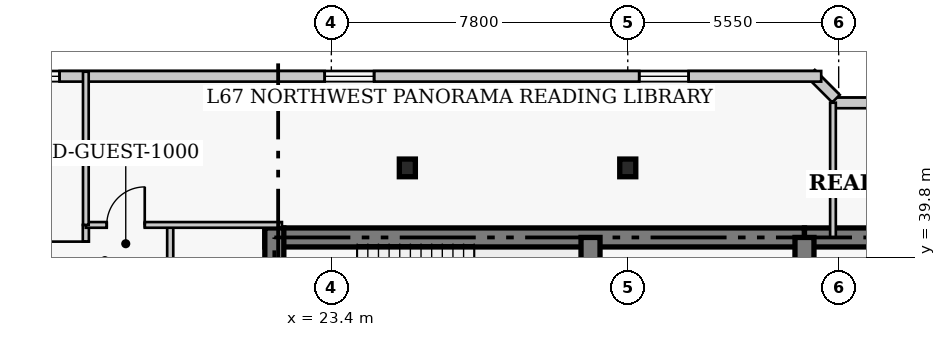
"""IFC4 building model, lengths in metres.
Left out: names, types, materials, properties, quantities, classifications, styles, units other than length and angle.
Written with IfcOpenShell. Run it as: python <this file> out.ifc"""

import sys

from ifc_helpers import new_model, si_unit, direction, frame, frame_2d, origin, origin_2d, place, context, subcontext, project, spatial, rectangle, i_section, extrude, element, fill, save


model = new_model("IFC4")
c1 = context("Model", 3, precision=1e-05, world=origin(), true_north=direction((0.0, 1.0)))
c2 = subcontext(c1, "Body", "Model", "MODEL_VIEW")
j1 = project(units=[si_unit("LENGTHUNIT", "METRE"), si_unit("PLANEANGLEUNIT", "RADIAN")], contexts=[c1])
p1 = place(None, origin())
s1 = spatial("IfcSite", under=j1, at=p1, CompositionType="ELEMENT")
p2 = place(p1, origin())
s2 = spatial("IfcBuilding", under=s1, at=p2, CompositionType="ELEMENT")
p3 = place(p2, frame((0.0, 0.0, 269.4)))
s3 = spatial("IfcBuildingStorey", under=s2, at=p3, CompositionType="ELEMENT", Elevation=269.4)
p4 = place(p3, frame((21.65, 40.32, 0.0), z_axis=(0.0, 0.0, 1.0), x_axis=(1.0, 0.0, 0.0)))
e1 = element("IfcWall", 1, at=p4, inside=s3, PredefinedType="SHEAR", context=c2, shape_type="SweptSolid", body=[
    extrude(rectangle(XDim=14.2, YDim=0.5, at=frame_2d((7.1, 0.0))), origin(), (0.0, 0.0, 1.0), 4.0),
])
p5 = place(p3, frame((35.85, 40.32, 0.0), z_axis=(0.0, 0.0, 1.0), x_axis=(1.0, 0.0, 0.0)))
e2 = element("IfcWall", 2, at=p5, inside=s3, PredefinedType="SHEAR", context=c2, shape_type="SweptSolid", body=[
    extrude(rectangle(XDim=12.6, YDim=0.5, at=frame_2d((6.3, 0.0))), origin(), (0.0, 0.0, 1.0), 4.0),
])
p6 = place(p3, frame((21.9, 27.05, 0.0), z_axis=(0.0, 0.0, 1.0), x_axis=(0.0, 1.0, 0.0)))
e3 = element("IfcWall", 3, at=p6, inside=s3, PredefinedType="SHEAR", context=c2, shape_type="SweptSolid", body=[
    extrude(rectangle(XDim=13.52, YDim=0.5, at=frame_2d((6.76, 0.0))), origin(), (0.0, 0.0, 1.0), 4.0),
])
p7 = place(p3, frame((30.22, 33.0, 0.0), z_axis=(0.0, 0.0, 1.0), x_axis=(0.0, 1.0, 0.0)))
e4 = element("IfcWall", 4, at=p7, inside=s3, PredefinedType="SHEAR", context=c2, shape_type="SweptSolid", body=[
    extrude(rectangle(XDim=7.32, YDim=0.5, at=frame_2d((3.66, 0.0))), origin(), (0.0, 0.0, 1.0), 4.0),
])
p8 = place(p3, frame((35.85, 36.37, 0.0), z_axis=(0.0, 0.0, 1.0), x_axis=(0.0, 1.0, 0.0)))
e5 = element("IfcWall", 5, at=p8, inside=s3, PredefinedType="SHEAR", context=c2, shape_type="SweptSolid", body=[
    extrude(rectangle(XDim=3.95, YDim=0.5, at=frame_2d((1.975, 0.0))), origin(), (0.0, 0.0, 1.0), 4.0),
])
p9 = place(p8, frame((0.88, 0.0, 0.0)))
e6 = element("IfcOpeningElement", 6, at=p9, cuts=e5, PredefinedType="OPENING", context=c2, shape_type="SweptSolid", body=[
    extrude(rectangle(XDim=1.1, YDim=2.15, at=frame_2d((0.55, 1.075))), frame((0.0, 0.26, 0.0), z_axis=(0.0, -1.0, 0.0), x_axis=(1.0, 0.0, 0.0)), (0.0, 0.0, 1.0), 0.52),
])
for number, where, z_axis, x_axis in (
    (7, (25.4, 42.15, 0.0), (0.0, 0.0, 1.0), (1.0, 0.0, 0.0)),
    (8, (31.2, 42.15, 0.0), (0.0, 0.0, 1.0), (1.0, 0.0, 0.0)),
):
    element("IfcColumn", number, at=place(p3, frame(where, z_axis=z_axis, x_axis=x_axis)), inside=s3, PredefinedType="COLUMN", context=c2, shape_type="SweptSolid", body=[
        extrude(i_section(OverallWidth=0.422, OverallDepth=0.465, WebThickness=0.045, FlangeThickness=0.073, FilletRadius=0.017, at=origin_2d()), origin(), (0.0, 0.0, 1.0), 4.0),
    ])
p10 = place(p3, frame((41.39, 43.86, 0.0), z_axis=(0.0, 0.0, 1.0), x_axis=(-1.0, 0.0, 0.0)))
e9 = element("IfcWall", 9, at=p10, inside=s3, PredefinedType="SOLIDWALL", context=c2, shape_type="SweptSolid", body=[
    extrude(rectangle(XDim=4.78, YDim=0.28, at=frame_2d((2.39, 0.0))), origin(), (0.0, 0.0, 1.0), 3.76),
])
p11 = place(p10, frame((1.74, 0.0, 0.85)))
e10 = element("IfcOpeningElement", 10, at=p11, cuts=e9, PredefinedType="OPENING", context=c2, shape_type="SweptSolid", body=[
    extrude(rectangle(XDim=1.3, YDim=1.7, at=frame_2d((0.65, 0.85))), frame((0.0, 0.15, 0.0), z_axis=(0.0, -1.0, 0.0), x_axis=(1.0, 0.0, 0.0)), (0.0, 0.0, 1.0), 0.3),
])
p12 = place(p3, frame((36.679, 43.973, 0.0), z_axis=(0.0, 0.0, 1.0), x_axis=(-0.706975312048, 0.707238225886, 0.0)))
e11 = element("IfcWall", 11, at=p12, inside=s3, PredefinedType="SOLIDWALL", context=c2, shape_type="SweptSolid", body=[
    extrude(rectangle(XDim=0.929, YDim=0.28, at=frame_2d((0.464, 0.0))), origin(), (0.0, 0.0, 1.0), 3.76),
])
p13 = place(p3, frame((36.29, 44.56, 0.0), z_axis=(0.0, 0.0, 1.0), x_axis=(-1.0, 0.0, 0.0)))
e12 = element("IfcWall", 12, at=p13, inside=s3, PredefinedType="SOLIDWALL", context=c2, shape_type="SweptSolid", body=[
    extrude(rectangle(XDim=24.83, YDim=0.28, at=frame_2d((12.415, 0.0))), origin(), (0.0, 0.0, 1.0), 3.76),
])
p14 = place(p13, frame((3.488, 0.0, 0.85)))
e13 = element("IfcOpeningElement", 13, at=p14, cuts=e12, PredefinedType="OPENING", context=c2, shape_type="SweptSolid", body=[
    extrude(rectangle(XDim=1.3, YDim=1.7, at=frame_2d((0.65, 0.85))), frame((0.0, 0.15, 0.0), z_axis=(0.0, -1.0, 0.0), x_axis=(1.0, 0.0, 0.0)), (0.0, 0.0, 1.0), 0.3),
])
p15 = place(p13, frame((11.765, 0.0, 0.85)))
e14 = element("IfcOpeningElement", 14, at=p15, cuts=e12, PredefinedType="OPENING", context=c2, shape_type="SweptSolid", body=[
    extrude(rectangle(XDim=1.3, YDim=1.7, at=frame_2d((0.65, 0.85))), frame((0.0, 0.15, 0.0), z_axis=(0.0, -1.0, 0.0), x_axis=(1.0, 0.0, 0.0)), (0.0, 0.0, 1.0), 0.3),
])
p16 = place(p13, frame((20.042, 0.0, 0.85)))
e15 = element("IfcOpeningElement", 15, at=p16, cuts=e12, PredefinedType="OPENING", context=c2, shape_type="SweptSolid", body=[
    extrude(rectangle(XDim=1.3, YDim=1.7, at=frame_2d((0.65, 0.85))), frame((0.0, 0.15, 0.0), z_axis=(0.0, -1.0, 0.0), x_axis=(1.0, 0.0, 0.0)), (0.0, 0.0, 1.0), 0.3),
])
p17 = place(p3, frame((16.94, 8.55, 0.0), z_axis=(0.0, 0.0, 1.0), x_axis=(0.0, 1.0, 0.0)))
e16 = element("IfcWall", 16, at=p17, inside=s3, PredefinedType="PARTITIONING", context=c2, shape_type="SweptSolid", body=[
    extrude(rectangle(XDim=32.1, YDim=0.16, at=frame_2d((16.05, 0.0))), origin(), (0.0, 0.0, 1.0), 3.76),
])
p18 = place(p17, frame((5.25, 0.0, 0.0)))
e17 = element("IfcOpeningElement", 17, at=p18, cuts=e16, PredefinedType="OPENING", context=c2, shape_type="SweptSolid", body=[
    extrude(rectangle(XDim=0.95, YDim=2.1, at=frame_2d((0.475, 1.05))), frame((0.0, 0.09, 0.0), z_axis=(0.0, -1.0, 0.0), x_axis=(1.0, 0.0, 0.0)), (0.0, 0.0, 1.0), 0.18),
])
p19 = place(p17, frame((15.375, 0.0, 0.0)))
e18 = element("IfcOpeningElement", 18, at=p19, cuts=e16, PredefinedType="OPENING", context=c2, shape_type="SweptSolid", body=[
    extrude(rectangle(XDim=0.95, YDim=2.1, at=frame_2d((0.475, 1.05))), frame((0.0, 0.09, 0.0), z_axis=(0.0, -1.0, 0.0), x_axis=(1.0, 0.0, 0.0)), (0.0, 0.0, 1.0), 0.18),
])
p20 = place(p17, frame((23.425, 0.0, 0.0)))
e19 = element("IfcOpeningElement", 19, at=p20, cuts=e16, PredefinedType="OPENING", context=c2, shape_type="SweptSolid", body=[
    extrude(rectangle(XDim=0.95, YDim=2.1, at=frame_2d((0.475, 1.05))), frame((0.0, 0.09, 0.0), z_axis=(0.0, -1.0, 0.0), x_axis=(1.0, 0.0, 0.0)), (0.0, 0.0, 1.0), 0.18),
])
p21 = place(p17, frame((30.66, 0.0, 0.0)))
e20 = element("IfcOpeningElement", 20, at=p21, cuts=e16, PredefinedType="OPENING", context=c2, shape_type="SweptSolid", body=[
    extrude(rectangle(XDim=1.0, YDim=2.15, at=frame_2d((0.5, 1.075))), frame((0.0, 0.09, 0.0), z_axis=(0.0, -1.0, 0.0), x_axis=(1.0, 0.0, 0.0)), (0.0, 0.0, 1.0), 0.18),
])
p22 = place(p3, frame((19.16, 35.02, 0.0), z_axis=(0.0, 0.0, 1.0), x_axis=(0.0, 1.0, 0.0)))
e21 = element("IfcWall", 21, at=p22, inside=s3, PredefinedType="PARTITIONING", context=c2, shape_type="SweptSolid", body=[
    extrude(rectangle(XDim=5.63, YDim=0.16, at=frame_2d((2.815, 0.0))), origin(), (0.0, 0.0, 1.0), 3.76),
])
p23 = place(p3, frame((16.94, 40.65, 0.0), z_axis=(0.0, 0.0, 1.0), x_axis=(1.0, 0.0, 0.0)))
e22 = element("IfcWall", 22, at=p23, inside=s3, PredefinedType="PARTITIONING", context=c2, shape_type="SweptSolid", body=[
    extrude(rectangle(XDim=5.16, YDim=0.15, at=frame_2d((2.58, 0.0))), origin(), (0.0, 0.0, 1.0), 3.76),
])
p24 = place(p23, frame((0.55, 0.0, 0.0)))
e23 = element("IfcOpeningElement", 23, at=p24, cuts=e22, PredefinedType="OPENING", context=c2, shape_type="SweptSolid", body=[
    extrude(rectangle(XDim=1.0, YDim=2.15, at=frame_2d((0.5, 1.075))), frame((0.0, 0.085, 0.0), z_axis=(0.0, -1.0, 0.0), x_axis=(1.0, 0.0, 0.0)), (0.0, 0.0, 1.0), 0.17),
])
p25 = place(p3, frame((16.94, 40.65, 0.0), z_axis=(0.0, 0.0, 1.0), x_axis=(0.0, 1.0, 0.0)))
e24 = element("IfcWall", 24, at=p25, inside=s3, PredefinedType="PARTITIONING", context=c2, shape_type="SweptSolid", body=[
    extrude(rectangle(XDim=4.03, YDim=0.15, at=frame_2d((2.015, 0.0))), origin(), (0.0, 0.0, 1.0), 3.76),
])
p26 = place(p3, frame((36.6, 40.32, 0.0), z_axis=(0.0, 0.0, 1.0), x_axis=(0.0, 1.0, 0.0)))
e25 = element("IfcWall", 25, at=p26, inside=s3, PredefinedType="PARTITIONING", context=c2, shape_type="SweptSolid", body=[
    extrude(rectangle(XDim=3.545, YDim=0.15, at=frame_2d((1.772, 0.0))), origin(), (0.0, 0.0, 1.0), 3.76),
])
p27 = place(p14, origin())
e26 = element("IfcWindow", 26, at=p27, inside=s3, PartitioningType="SINGLE_PANEL", PredefinedType="WINDOW", context=c2, shape_type="SweptSolid", body=[
    extrude(rectangle(XDim=1.3, YDim=1.7, at=frame_2d((0.65, 0.85))), frame((0.0, 0.03, 0.0), z_axis=(0.0, -1.0, 0.0), x_axis=(1.0, 0.0, 0.0)), (0.0, 0.0, 1.0), 0.06),
])
fill(e13, e26)
p28 = place(p15, origin())
e27 = element("IfcWindow", 27, at=p28, inside=s3, PartitioningType="SINGLE_PANEL", PredefinedType="WINDOW", context=c2, shape_type="SweptSolid", body=[
    extrude(rectangle(XDim=1.3, YDim=1.7, at=frame_2d((0.65, 0.85))), frame((0.0, 0.03, 0.0), z_axis=(0.0, -1.0, 0.0), x_axis=(1.0, 0.0, 0.0)), (0.0, 0.0, 1.0), 0.06),
])
fill(e14, e27)
p29 = place(p16, origin())
e28 = element("IfcWindow", 28, at=p29, inside=s3, PartitioningType="SINGLE_PANEL", PredefinedType="WINDOW", context=c2, shape_type="SweptSolid", body=[
    extrude(rectangle(XDim=1.3, YDim=1.7, at=frame_2d((0.65, 0.85))), frame((0.0, 0.03, 0.0), z_axis=(0.0, -1.0, 0.0), x_axis=(1.0, 0.0, 0.0)), (0.0, 0.0, 1.0), 0.06),
])
fill(e15, e28)
p30 = place(p24, origin())
e29 = element("IfcDoor", 29, at=p30, inside=s3, OperationType="SINGLE_SWING_RIGHT", PredefinedType="DOOR", context=c2, shape_type="SweptSolid", body=[
    extrude(rectangle(XDim=1.0, YDim=2.15, at=frame_2d((0.5, 1.075))), frame((0.0, 0.025, 0.0), z_axis=(0.0, -1.0, 0.0), x_axis=(1.0, 0.0, 0.0)), (0.0, 0.0, 1.0), 0.05),
])
fill(e23, e29)
p31 = place(p21, origin())
e30 = element("IfcDoor", 30, at=p31, inside=s3, OperationType="SINGLE_SWING_RIGHT", PredefinedType="DOOR", context=c2, shape_type="SweptSolid", body=[
    extrude(rectangle(XDim=1.0, YDim=2.15, at=frame_2d((0.5, 1.075))), frame((0.0, 0.025, 0.0), z_axis=(0.0, -1.0, 0.0), x_axis=(1.0, 0.0, 0.0)), (0.0, 0.0, 1.0), 0.05),
])
fill(e20, e30)
save(model, sys.argv[1])
